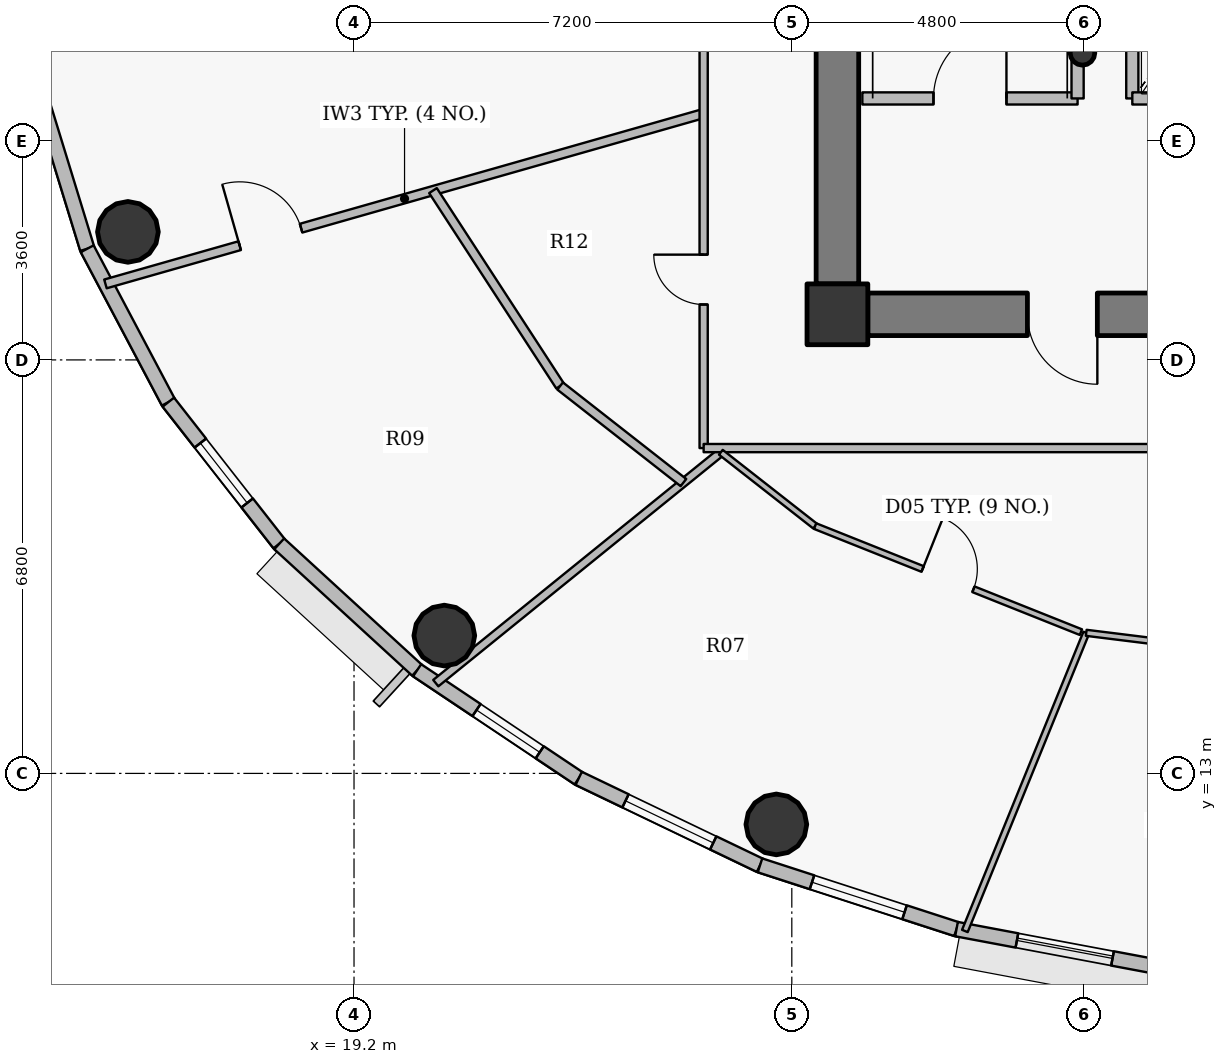
"""IFC4 building model, lengths in metres.
Left out: names, types, materials, properties, quantities, classifications, styles, units other than length and angle.
Written with IfcOpenShell. Run it as: python <this file> out.ifc"""

import sys

from ifc_helpers import new_model, si_unit, direction, frame, frame_2d, origin, origin_2d, place, context, subcontext, project, spatial, rectangle, hollow_circle, extrude, source, transform, mapped, element, fill, save


model = new_model("IFC4")
c1 = context("Model", 3, precision=1e-05, world=origin(), true_north=direction((0.0, 1.0)))
c2 = subcontext(c1, "Body", "Model", "MODEL_VIEW")
j1 = project(units=[si_unit("LENGTHUNIT", "METRE"), si_unit("PLANEANGLEUNIT", "RADIAN")], contexts=[c1])
p1 = place(None, origin())
s1 = spatial("IfcSite", under=j1, at=p1, CompositionType="ELEMENT")
p2 = place(p1, origin())
s2 = spatial("IfcBuilding", under=s1, at=p2, CompositionType="ELEMENT")
p3 = place(p2, frame((0.0, 0.0, 314.25)))
s3 = spatial("IfcBuildingStorey", under=s2, at=p3, CompositionType="ELEMENT", Elevation=314.25)
p4 = place(p3, frame((27.15, 20.55, 0.0), z_axis=(0.0, 0.0, 1.0), x_axis=(1.0, 0.0, 0.0)))
e1 = element("IfcColumn", 1, at=p4, inside=s3, PredefinedType="COLUMN", context=c2, shape_type="SweptSolid", body=[
    extrude(rectangle(XDim=1.0, YDim=1.0, at=origin_2d()), origin(), (0.0, 0.0, 1.0), 3.75),
])
p5 = place(p3, frame((31.18, 24.85, 0.0), z_axis=(0.0, 0.0, 1.0), x_axis=(1.0, 0.0, 0.0)))
e2 = element("IfcColumn", 2, at=p5, inside=s3, PredefinedType="COLUMN", context=c2, shape_type="SweptSolid", body=[
    extrude(hollow_circle(Radius=0.203, WallThickness=0.016, at=origin_2d()), origin(), (0.0, 0.0, 1.0), 3.75),
])
p6 = place(p3, frame((44.35, 20.55, 0.0), z_axis=(0.0, 0.0, 1.0), x_axis=(-1.0, 0.0, 0.0)))
e3 = element("IfcWall", 3, at=p6, inside=s3, PredefinedType="SHEAR", context=c2, shape_type="SweptSolid", body=[
    extrude(rectangle(XDim=16.7, YDim=0.7, at=frame_2d((8.35, 0.0))), origin(), (0.0, 0.0, 1.0), 3.0),
])
p7 = place(p6, frame((12.925, 0.0, 0.0)))
e4 = element("IfcOpeningElement", 4, at=p7, cuts=e3, PredefinedType="OPENING", context=c2, shape_type="SweptSolid", body=[
    extrude(rectangle(XDim=1.15, YDim=2.15, at=origin_2d()), frame((0.575, 0.36, 1.075), z_axis=(0.0, -1.0, 0.0), x_axis=(1.0, 0.0, 0.0)), (0.0, 0.0, 1.0), 0.72),
])
p8 = place(p6, frame((9.1, 0.0, 0.0)))
e5 = element("IfcOpeningElement", 5, at=p8, cuts=e3, PredefinedType="OPENING", context=c2, shape_type="SweptSolid", body=[
    extrude(rectangle(XDim=1.15, YDim=2.15, at=origin_2d()), frame((0.575, 0.36, 1.075), z_axis=(0.0, -1.0, 0.0), x_axis=(1.0, 0.0, 0.0)), (0.0, 0.0, 1.0), 0.72),
])
p9 = place(p3, frame((27.15, 21.05, 0.0), z_axis=(0.0, 0.0, 1.0), x_axis=(0.0, 1.0, 0.0)))
e6 = element("IfcWall", 6, at=p9, inside=s3, PredefinedType="SHEAR", context=c2, shape_type="SweptSolid", body=[
    extrude(rectangle(XDim=11.9, YDim=0.7, at=frame_2d((5.95, 0.0))), origin(), (0.0, 0.0, 1.0), 3.0),
])
for number, where, z_axis, x_axis in (
    (7, (15.481, 21.906, 0.0), (0.0, 0.0, 1.0), (1.0, 0.0, 0.0)),
    (8, (20.685, 15.267, 0.0), (0.0, 0.0, 1.0), (1.0, 0.0, 0.0)),
    (9, (26.146, 12.161, 0.0), (0.0, 0.0, 1.0), (1.0, 0.0, 0.0)),
):
    element("IfcColumn", number, at=place(p3, frame(where, z_axis=z_axis, x_axis=x_axis)), inside=s3, PredefinedType="COLUMN", context=c2, shape_type="SweptSolid", body=[
        extrude(hollow_circle(Radius=0.5, WallThickness=0.032, at=origin_2d()), origin(), (0.0, 0.0, 1.0), 3.75),
    ])
p10 = place(p3, frame((14.812, 21.628, 0.0), z_axis=(0.0, 0.0, 1.0), x_axis=(-0.2931213403, 0.956075248012, 0.0)))
e10 = element("IfcWall", 10, at=p10, inside=s3, PredefinedType="SOLIDWALL", context=c2, shape_type="SweptSolid", body=[
    extrude(rectangle(XDim=2.775, YDim=0.24, at=frame_2d((1.388, 0.0))), origin(), (0.0, 0.0, 1.0), 3.45),
])
p11 = place(p3, frame((16.146, 19.105, 0.0), z_axis=(0.0, 0.0, 1.0), x_axis=(-0.467628269026, 0.883925224218, 0.0)))
e11 = element("IfcWall", 11, at=p11, inside=s3, PredefinedType="SOLIDWALL", context=c2, shape_type="SweptSolid", body=[
    extrude(rectangle(XDim=2.854, YDim=0.24, at=frame_2d((1.427, 0.0))), origin(), (0.0, 0.0, 1.0), 3.45),
])
p12 = place(p3, frame((17.97, 16.775, 0.0), z_axis=(0.0, 0.0, 1.0), x_axis=(-0.616337186556, 0.787482363275, 0.0)))
e12 = element("IfcWall", 12, at=p12, inside=s3, PredefinedType="SOLIDWALL", context=c2, shape_type="SweptSolid", body=[
    extrude(rectangle(XDim=2.958, YDim=0.24, at=frame_2d((1.479, 0.0))), origin(), (0.0, 0.0, 1.0), 3.45),
])
p13 = place(p12, frame((0.854, 0.0, 0.9)))
e13 = element("IfcOpeningElement", 13, at=p13, cuts=e12, PredefinedType="OPENING", context=c2, shape_type="SweptSolid", body=[
    extrude(rectangle(XDim=1.25, YDim=1.65, at=origin_2d()), frame((0.625, 0.13, 0.825), z_axis=(0.0, -1.0, 0.0), x_axis=(1.0, 0.0, 0.0)), (0.0, 0.0, 1.0), 0.26),
])
p14 = place(p3, frame((20.238, 14.696, 0.0), z_axis=(0.0, 0.0, 1.0), x_axis=(-0.737068506972, 0.675818034703, 0.0)))
e14 = element("IfcWall", 14, at=p14, inside=s3, PredefinedType="SOLIDWALL", context=c2, shape_type="SweptSolid", body=[
    extrude(rectangle(XDim=3.077, YDim=0.24, at=frame_2d((1.539, 0.0))), origin(), (0.0, 0.0, 1.0), 3.45),
])
p15 = place(p3, frame((22.896, 12.918, 0.0), z_axis=(0.0, 0.0, 1.0), x_axis=(-0.831250592635, 0.55589787933, 0.0)))
e15 = element("IfcWall", 15, at=p15, inside=s3, PredefinedType="SOLIDWALL", context=c2, shape_type="SweptSolid", body=[
    extrude(rectangle(XDim=3.197, YDim=0.24, at=frame_2d((1.599, 0.0))), origin(), (0.0, 0.0, 1.0), 3.45),
])
p16 = place(p15, frame((0.772, 0.0, 0.9)))
e16 = element("IfcOpeningElement", 16, at=p16, cuts=e15, PredefinedType="OPENING", context=c2, shape_type="SweptSolid", body=[
    extrude(rectangle(XDim=1.25, YDim=1.65, at=origin_2d()), frame((0.625, 0.13, 0.825), z_axis=(0.0, -1.0, 0.0), x_axis=(1.0, 0.0, 0.0)), (0.0, 0.0, 1.0), 0.26),
])
p17 = place(p3, frame((25.877, 11.488, 0.0), z_axis=(0.0, 0.0, 1.0), x_axis=(-0.901573741254, 0.43262546051, 0.0)))
e17 = element("IfcWall", 17, at=p17, inside=s3, PredefinedType="SOLIDWALL", context=c2, shape_type="SweptSolid", body=[
    extrude(rectangle(XDim=3.307, YDim=0.24, at=frame_2d((1.653, 0.0))), origin(), (0.0, 0.0, 1.0), 3.45),
])
p18 = place(p17, frame((0.853, 0.0, 0.9)))
e18 = element("IfcOpeningElement", 18, at=p18, cuts=e17, PredefinedType="OPENING", context=c2, shape_type="SweptSolid", body=[
    extrude(rectangle(XDim=1.6, YDim=1.75, at=origin_2d()), frame((0.8, 0.13, 0.875), z_axis=(0.0, -1.0, 0.0), x_axis=(1.0, 0.0, 0.0)), (0.0, 0.0, 1.0), 0.26),
])
p19 = place(p3, frame((29.109, 10.44, 0.0), z_axis=(0.0, 0.0, 1.0), x_axis=(-0.95123136723, 0.308478339592, 0.0)))
e19 = element("IfcWall", 19, at=p19, inside=s3, PredefinedType="SOLIDWALL", context=c2, shape_type="SweptSolid", body=[
    extrude(rectangle(XDim=3.398, YDim=0.24, at=frame_2d((1.699, 0.0))), origin(), (0.0, 0.0, 1.0), 3.45),
])
p20 = place(p19, frame((0.899, 0.0, 0.9)))
e20 = element("IfcOpeningElement", 20, at=p20, cuts=e19, PredefinedType="OPENING", context=c2, shape_type="SweptSolid", body=[
    extrude(rectangle(XDim=1.6, YDim=1.75, at=origin_2d()), frame((0.8, 0.13, 0.875), z_axis=(0.0, -1.0, 0.0), x_axis=(1.0, 0.0, 0.0)), (0.0, 0.0, 1.0), 0.26),
])
p21 = place(p3, frame((32.511, 9.8, 0.0), z_axis=(0.0, 0.0, 1.0), x_axis=(-0.982782655757, 0.184765395959, 0.0)))
e21 = element("IfcWall", 21, at=p21, inside=s3, PredefinedType="SOLIDWALL", context=c2, shape_type="SweptSolid", body=[
    extrude(rectangle(XDim=3.462, YDim=0.24, at=frame_2d((1.731, 0.0))), origin(), (0.0, 0.0, 1.0), 3.45),
])
p22 = place(p21, frame((0.851, 0.0, 0.9)))
e22 = element("IfcOpeningElement", 22, at=p22, cuts=e21, PredefinedType="OPENING", context=c2, shape_type="SweptSolid", body=[
    extrude(rectangle(XDim=1.6, YDim=1.75, at=origin_2d()), frame((0.8, 0.13, 0.875), z_axis=(0.0, -1.0, 0.0), x_axis=(1.0, 0.0, 0.0)), (0.0, 0.0, 1.0), 0.26),
])
p23 = place(p3, frame((15.112, 21.05, 0.0), z_axis=(0.0, 0.0, 1.0), x_axis=(0.961740695875, 0.273961373004, 0.0)))
e23 = element("IfcWall", 23, at=p23, inside=s3, PredefinedType="PARTITIONING", context=c2, shape_type="SweptSolid", body=[
    extrude(rectangle(XDim=10.229, YDim=0.15, at=frame_2d((5.115, 0.0))), origin(), (0.0, 0.0, 1.0), 2.935),
])
p24 = place(p23, frame((2.295, 0.0, 0.0)))
e24 = element("IfcOpeningElement", 24, at=p24, cuts=e23, PredefinedType="OPENING", context=c2, shape_type="SweptSolid", body=[
    extrude(rectangle(XDim=1.05, YDim=2.15, at=origin_2d()), frame((0.525, 0.085, 1.075), z_axis=(0.0, -1.0, 0.0), x_axis=(1.0, 0.0, 0.0)), (0.0, 0.0, 1.0), 0.17),
])
p25 = place(p3, frame((20.499, 22.584, 0.0), z_axis=(0.0, 0.0, 1.0), x_axis=(0.545422512832, -0.838161250892, 0.0)))
e25 = element("IfcWall", 25, at=p25, inside=s3, PredefinedType="PARTITIONING", context=c2, shape_type="SweptSolid", body=[
    extrude(rectangle(XDim=3.834, YDim=0.15, at=frame_2d((1.917, 0.0))), origin(), (0.0, 0.0, 1.0), 3.45),
])
p26 = place(p3, frame((20.545, 14.485, 0.0), z_axis=(0.0, 0.0, 1.0), x_axis=(0.77715155867, 0.629313479004, 0.0)))
e26 = element("IfcWall", 26, at=p26, inside=s3, PredefinedType="PARTITIONING", context=c2, shape_type="SweptSolid", body=[
    extrude(rectangle(XDim=6.032, YDim=0.135, at=frame_2d((3.016, 0.0))), origin(), (0.0, 0.0, 1.0), 2.935),
])
p27 = place(p3, frame((22.59, 19.371, 0.0), z_axis=(0.0, 0.0, 1.0), x_axis=(0.78729093539, -0.616581692116, 0.0)))
e27 = element("IfcWall", 27, at=p27, inside=s3, PredefinedType="PARTITIONING", context=c2, shape_type="SweptSolid", body=[
    extrude(rectangle(XDim=2.576, YDim=0.15, at=frame_2d((1.288, 0.0))), origin(), (0.0, 0.0, 1.0), 2.985),
])
p28 = place(p3, frame((24.95, 18.35, 0.0), z_axis=(0.0, 0.0, 1.0), x_axis=(0.0, 1.0, 0.0)))
e28 = element("IfcWall", 28, at=p28, inside=s3, PredefinedType="PARTITIONING", context=c2, shape_type="SweptSolid", body=[
    extrude(rectangle(XDim=11.45, YDim=0.135, at=frame_2d((5.725, 0.0))), origin(), (0.0, 0.0, 1.0), 2.985),
])
p29 = place(p28, frame((7.931, 0.0, 0.0)))
e29 = element("IfcOpeningElement", 29, at=p29, cuts=e28, PredefinedType="OPENING", context=c2, shape_type="SweptSolid", body=[
    extrude(rectangle(XDim=1.05, YDim=2.15, at=origin_2d()), frame((0.525, 0.078, 1.075), z_axis=(0.0, -1.0, 0.0), x_axis=(1.0, 0.0, 0.0)), (0.0, 0.0, 1.0), 0.155),
])
p30 = place(p28, frame((2.361, 0.0, 0.0)))
e30 = element("IfcOpeningElement", 30, at=p30, cuts=e28, PredefinedType="OPENING", context=c2, shape_type="SweptSolid", body=[
    extrude(rectangle(XDim=0.82, YDim=2.1, at=origin_2d()), frame((0.41, 0.078, 1.05), z_axis=(0.0, -1.0, 0.0), x_axis=(1.0, 0.0, 0.0)), (0.0, 0.0, 1.0), 0.155),
])
p31 = place(p3, frame((24.95, 18.35, 0.0), z_axis=(0.0, 0.0, 1.0), x_axis=(1.0, 0.0, 0.0)))
e31 = element("IfcWall", 31, at=p31, inside=s3, PredefinedType="PARTITIONING", context=c2, shape_type="SweptSolid", body=[
    extrude(rectangle(XDim=19.311, YDim=0.135, at=frame_2d((9.655, 0.0))), origin(), (0.0, 0.0, 1.0), 2.985),
])
p32 = place(p31, frame((9.319, 0.0, 0.0)))
e32 = element("IfcOpeningElement", 32, at=p32, cuts=e31, PredefinedType="OPENING", context=c2, shape_type="SweptSolid", body=[
    extrude(rectangle(XDim=1.0, YDim=2.15, at=origin_2d()), frame((0.5, 0.078, 1.075), z_axis=(0.0, -1.0, 0.0), x_axis=(1.0, 0.0, 0.0)), (0.0, 0.0, 1.0), 0.155),
])
p33 = place(p3, frame((25.233, 18.281, 0.0), z_axis=(0.0, 0.0, 1.0), x_axis=(0.787345395334, -0.61651214785, 0.0)))
e33 = element("IfcWall", 33, at=p33, inside=s3, PredefinedType="PARTITIONING", context=c2, shape_type="SweptSolid", body=[
    extrude(rectangle(XDim=1.969, YDim=0.1, at=frame_2d((0.985, 0.0))), origin(), (0.0, 0.0, 1.0), 3.45),
])
p34 = place(p3, frame((26.783, 17.067, 0.0), z_axis=(0.0, 0.0, 1.0), x_axis=(0.928809047774, -0.370558703544, 0.0)))
e34 = element("IfcWall", 34, at=p34, inside=s3, PredefinedType="PARTITIONING", context=c2, shape_type="SweptSolid", body=[
    extrude(rectangle(XDim=4.706, YDim=0.1, at=frame_2d((2.353, 0.0))), origin(), (0.0, 0.0, 1.0), 2.985),
])
p35 = place(p34, frame((1.903, 0.0, 0.0)))
e35 = element("IfcOpeningElement", 35, at=p35, cuts=e34, PredefinedType="OPENING", context=c2, shape_type="SweptSolid", body=[
    extrude(rectangle(XDim=0.9, YDim=2.1, at=origin_2d()), frame((0.45, 0.06, 1.05), z_axis=(0.0, -1.0, 0.0), x_axis=(1.0, 0.0, 0.0)), (0.0, 0.0, 1.0), 0.12),
])
p36 = place(p3, frame((27.56, 24.1, 0.0), z_axis=(0.0, 0.0, 1.0), x_axis=(1.0, 0.0, 0.0)))
e36 = element("IfcWall", 36, at=p36, inside=s3, PredefinedType="PARTITIONING", context=c2, shape_type="SweptSolid", body=[
    extrude(rectangle(XDim=3.54, YDim=0.2, at=frame_2d((1.77, 0.0))), origin(), (0.0, 0.0, 1.0), 3.45),
])
p37 = place(p36, frame((1.17, 0.0, 0.0)))
e37 = element("IfcOpeningElement", 37, at=p37, cuts=e36, PredefinedType="OPENING", context=c2, shape_type="SweptSolid", body=[
    extrude(rectangle(XDim=1.2, YDim=2.15, at=origin_2d()), frame((0.6, 0.11, 1.075), z_axis=(0.0, -1.0, 0.0), x_axis=(1.0, 0.0, 0.0)), (0.0, 0.0, 1.0), 0.22),
])
p38 = place(p3, frame((29.246, 10.409, 0.0), z_axis=(0.0, 0.0, 1.0), x_axis=(0.377005355791, 0.926211078375, 0.0)))
e38 = element("IfcWall", 38, at=p38, inside=s3, PredefinedType="PARTITIONING", context=c2, shape_type="SweptSolid", body=[
    extrude(rectangle(XDim=5.294, YDim=0.1, at=frame_2d((2.647, 0.0))), origin(), (0.0, 0.0, 1.0), 2.935),
])
p39 = place(p3, frame((31.1, 24.1, 0.0), z_axis=(0.0, 0.0, 1.0), x_axis=(0.0, 1.0, 0.0)))
e39 = element("IfcWall", 39, at=p39, inside=s3, PredefinedType="PARTITIONING", context=c2, shape_type="SweptSolid", body=[
    extrude(rectangle(XDim=1.44, YDim=0.2, at=frame_2d((0.72, 0.0))), origin(), (0.0, 0.0, 1.0), 3.45),
])
p40 = place(p3, frame((31.242, 15.312, 0.0), z_axis=(0.0, 0.0, 1.0), x_axis=(0.992396501967, -0.123082016895, 0.0)))
e40 = element("IfcWall", 40, at=p40, inside=s3, PredefinedType="PARTITIONING", context=c2, shape_type="SweptSolid", body=[
    extrude(rectangle(XDim=4.794, YDim=0.1, at=frame_2d((2.397, 0.0))), origin(), (0.0, 0.0, 1.0), 2.985),
])
p41 = place(p40, frame((1.947, 0.0, 0.0)))
e41 = element("IfcOpeningElement", 41, at=p41, cuts=e40, PredefinedType="OPENING", context=c2, shape_type="SweptSolid", body=[
    extrude(rectangle(XDim=0.9, YDim=2.1, at=origin_2d()), frame((0.45, 0.06, 1.05), z_axis=(0.0, -1.0, 0.0), x_axis=(1.0, 0.0, 0.0)), (0.0, 0.0, 1.0), 0.12),
])
p42 = place(p3, frame((32.0, 24.1, 0.0), z_axis=(0.0, 0.0, 1.0), x_axis=(0.0, 1.0, 0.0)))
e42 = element("IfcWall", 42, at=p42, inside=s3, PredefinedType="PARTITIONING", context=c2, shape_type="SweptSolid", body=[
    extrude(rectangle(XDim=3.45, YDim=0.2, at=frame_2d((1.725, 0.0))), origin(), (0.0, 0.0, 1.0), 3.45),
])
p43 = place(p3, frame((32.0, 24.1, 0.0), z_axis=(0.0, 0.0, 1.0), x_axis=(1.0, 0.0, 0.0)))
e43 = element("IfcWall", 43, at=p43, inside=s3, PredefinedType="PARTITIONING", context=c2, shape_type="SweptSolid", body=[
    extrude(rectangle(XDim=1.9, YDim=0.2, at=frame_2d((0.95, 0.0))), origin(), (0.0, 0.0, 1.0), 3.035),
])
p44 = place(p43, frame((0.375, 0.0, 0.0)))
e44 = element("IfcOpeningElement", 44, at=p44, cuts=e43, PredefinedType="OPENING", context=c2, shape_type="SweptSolid", body=[
    extrude(rectangle(XDim=1.15, YDim=2.15, at=origin_2d()), frame((0.575, 0.11, 1.075), z_axis=(0.0, -1.0, 0.0), x_axis=(1.0, 0.0, 0.0)), (0.0, 0.0, 1.0), 0.22),
])
p45 = place(p3, frame((26.8, 21.04, 0.0), z_axis=(0.0, 0.0, 1.0), x_axis=(0.0, -1.0, 0.0)))
e45 = element("IfcWall", 45, at=p45, inside=s3, PredefinedType="PARTITIONING", context=c2, shape_type="SweptSolid", body=[
    extrude(rectangle(XDim=0.84, YDim=0.135, at=frame_2d((0.42, 0.0))), origin(), (0.0, 0.0, 1.0), 2.985),
])
p46 = place(p3, frame((27.107, 20.2, 0.0), z_axis=(0.0, 0.0, 1.0), x_axis=(1.0, 0.0, 0.0)))
e46 = element("IfcWall", 46, at=p46, inside=s3, PredefinedType="PARTITIONING", context=c2, shape_type="SweptSolid", body=[
    extrude(rectangle(XDim=0.532, YDim=0.135, at=frame_2d((0.266, 0.0))), origin(), (0.0, 0.0, 1.0), 2.985),
])
m1 = source(origin(), c2, "Body", "SweptSolid", [
    extrude(rectangle(XDim=1.25, YDim=1.65, at=origin_2d()), frame((0.625, 0.03, 0.825), z_axis=(0.0, -1.0, 0.0), x_axis=(1.0, 0.0, 0.0)), (0.0, 0.0, 1.0), 0.06),
])
p47 = place(p13, origin())
e47 = element("IfcWindow", 47, at=p47, inside=s3, PartitioningType="SINGLE_PANEL", PredefinedType="WINDOW", context=c2, shape_type="MappedRepresentation", body=[
    mapped(m1, transform((0.0, 0.0, 0.0), x_axis=(1.0, 0.0, 0.0), y_axis=(0.0, 1.0, 0.0), z_axis=(0.0, 0.0, 1.0), scale=1.0)),
])
fill(e13, e47)
p48 = place(p16, origin())
e48 = element("IfcWindow", 48, at=p48, inside=s3, PartitioningType="SINGLE_PANEL", PredefinedType="WINDOW", context=c2, shape_type="MappedRepresentation", body=[
    mapped(m1, transform((0.0, 0.0, 0.0), x_axis=(1.0, 0.0, 0.0), y_axis=(0.0, 1.0, 0.0), z_axis=(0.0, 0.0, 1.0), scale=1.0)),
])
fill(e16, e48)
m2 = source(origin(), c2, "Body", "SweptSolid", [
    extrude(rectangle(XDim=1.6, YDim=1.75, at=origin_2d()), frame((0.8, 0.03, 0.875), z_axis=(0.0, -1.0, 0.0), x_axis=(1.0, 0.0, 0.0)), (0.0, 0.0, 1.0), 0.06),
])
p49 = place(p18, origin())
e49 = element("IfcWindow", 49, at=p49, inside=s3, PartitioningType="DOUBLE_PANEL_VERTICAL", PredefinedType="WINDOW", context=c2, shape_type="MappedRepresentation", body=[
    mapped(m2, transform((0.0, 0.0, 0.0), x_axis=(1.0, 0.0, 0.0), y_axis=(0.0, 1.0, 0.0), z_axis=(0.0, 0.0, 1.0), scale=1.0)),
])
fill(e18, e49)
p50 = place(p20, origin())
e50 = element("IfcWindow", 50, at=p50, inside=s3, PartitioningType="DOUBLE_PANEL_VERTICAL", PredefinedType="WINDOW", context=c2, shape_type="MappedRepresentation", body=[
    mapped(m2, transform((0.0, 0.0, 0.0), x_axis=(1.0, 0.0, 0.0), y_axis=(0.0, 1.0, 0.0), z_axis=(0.0, 0.0, 1.0), scale=1.0)),
])
fill(e20, e50)
p51 = place(p22, origin())
e51 = element("IfcWindow", 51, at=p51, inside=s3, PartitioningType="DOUBLE_PANEL_VERTICAL", PredefinedType="WINDOW", context=c2, shape_type="MappedRepresentation", body=[
    mapped(m2, transform((0.0, 0.0, 0.0), x_axis=(1.0, 0.0, 0.0), y_axis=(0.0, 1.0, 0.0), z_axis=(0.0, 0.0, 1.0), scale=1.0)),
])
fill(e22, e51)
m3 = source(origin(), c2, "Body", "SweptSolid", [
    extrude(rectangle(XDim=1.15, YDim=2.15, at=origin_2d()), frame((0.575, 0.025, 1.075), z_axis=(0.0, -1.0, 0.0), x_axis=(1.0, 0.0, 0.0)), (0.0, 0.0, 1.0), 0.05),
])
p52 = place(p7, origin())
e52 = element("IfcDoor", 52, at=p52, inside=s3, OperationType="SINGLE_SWING_LEFT", PredefinedType="DOOR", context=c2, shape_type="MappedRepresentation", body=[
    mapped(m3, transform((0.0, 0.0, 0.0), x_axis=(1.0, 0.0, 0.0), y_axis=(0.0, 1.0, 0.0), z_axis=(0.0, 0.0, 1.0), scale=1.0)),
])
fill(e4, e52)
m4 = source(origin(), c2, "Body", "SweptSolid", [
    extrude(rectangle(XDim=1.2, YDim=2.15, at=origin_2d()), frame((0.6, 0.025, 1.075), z_axis=(0.0, -1.0, 0.0), x_axis=(1.0, 0.0, 0.0)), (0.0, 0.0, 1.0), 0.05),
])
p53 = place(p37, origin())
e53 = element("IfcDoor", 53, at=p53, inside=s3, OperationType="SINGLE_SWING_RIGHT", PredefinedType="DOOR", context=c2, shape_type="MappedRepresentation", body=[
    mapped(m4, transform((0.0, 0.0, 0.0), x_axis=(1.0, 0.0, 0.0), y_axis=(0.0, 1.0, 0.0), z_axis=(0.0, 0.0, 1.0), scale=1.0)),
])
fill(e37, e53)
m5 = source(origin(), c2, "Body", "SweptSolid", [
    extrude(rectangle(XDim=0.9, YDim=2.1, at=origin_2d()), frame((0.45, 0.025, 1.05), z_axis=(0.0, -1.0, 0.0), x_axis=(1.0, 0.0, 0.0)), (0.0, 0.0, 1.0), 0.05),
])
p54 = place(p35, origin())
e54 = element("IfcDoor", 54, at=p54, inside=s3, OperationType="SINGLE_SWING_LEFT", PredefinedType="DOOR", context=c2, shape_type="MappedRepresentation", body=[
    mapped(m5, transform((0.0, 0.0, 0.0), x_axis=(1.0, 0.0, 0.0), y_axis=(0.0, 1.0, 0.0), z_axis=(0.0, 0.0, 1.0), scale=1.0)),
])
fill(e35, e54)
m6 = source(origin(), c2, "Body", "SweptSolid", [
    extrude(rectangle(XDim=0.82, YDim=2.1, at=origin_2d()), frame((0.41, 0.025, 1.05), z_axis=(0.0, -1.0, 0.0), x_axis=(1.0, 0.0, 0.0)), (0.0, 0.0, 1.0), 0.05),
])
p55 = place(p30, origin())
e55 = element("IfcDoor", 55, at=p55, inside=s3, OperationType="SINGLE_SWING_RIGHT", PredefinedType="DOOR", context=c2, shape_type="MappedRepresentation", body=[
    mapped(m6, transform((0.0, 0.0, 0.0), x_axis=(1.0, 0.0, 0.0), y_axis=(0.0, 1.0, 0.0), z_axis=(0.0, 0.0, 1.0), scale=1.0)),
])
fill(e30, e55)
m7 = source(origin(), c2, "Body", "SweptSolid", [
    extrude(rectangle(XDim=1.05, YDim=2.15, at=origin_2d()), frame((0.525, 0.025, 1.075), z_axis=(0.0, -1.0, 0.0), x_axis=(1.0, 0.0, 0.0)), (0.0, 0.0, 1.0), 0.05),
])
p56 = place(p24, origin())
e56 = element("IfcDoor", 56, at=p56, inside=s3, OperationType="SINGLE_SWING_LEFT", PredefinedType="DOOR", context=c2, shape_type="MappedRepresentation", body=[
    mapped(m7, transform((0.0, 0.0, 0.0), x_axis=(1.0, 0.0, 0.0), y_axis=(0.0, 1.0, 0.0), z_axis=(0.0, 0.0, 1.0), scale=1.0)),
])
fill(e24, e56)
save(model, sys.argv[1])
